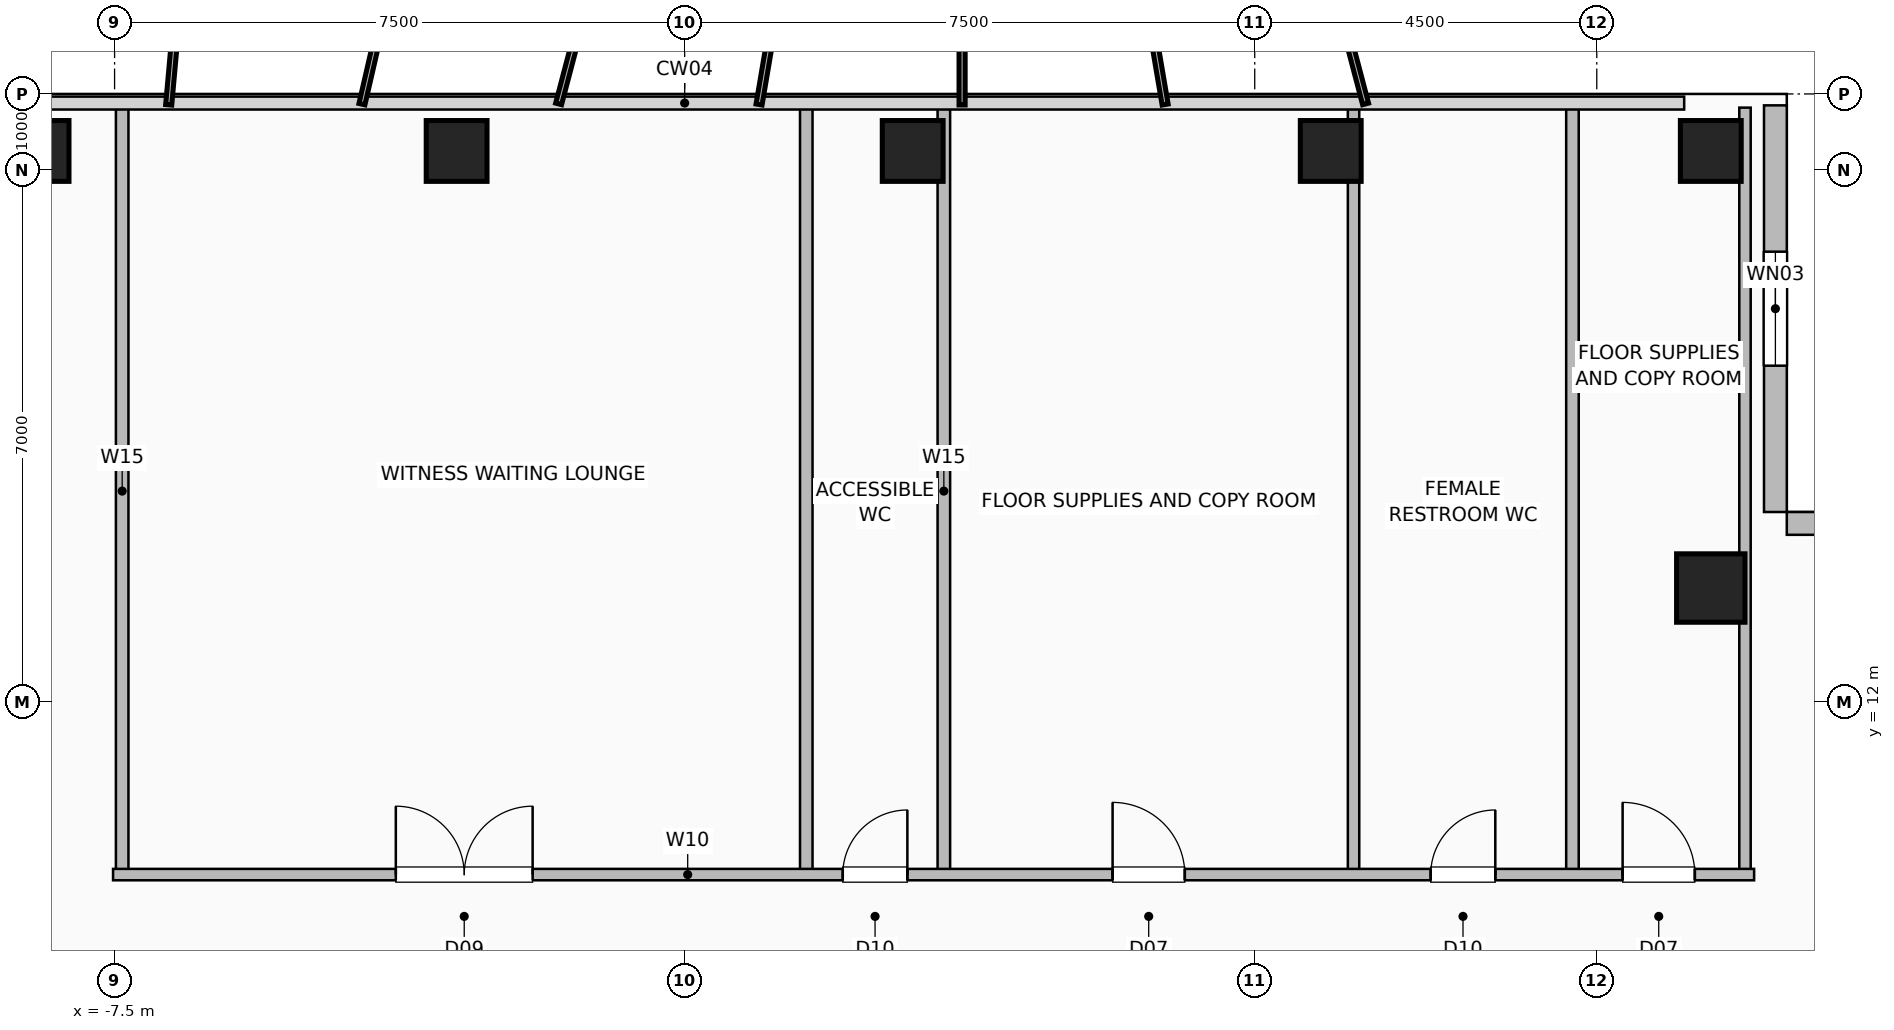
"""IFC4 building model, lengths in metres.
Left out: names, types, materials, properties, quantities, classifications, styles, units other than length and angle.
Written with IfcOpenShell. Run it as: python <this file> out.ifc"""

import sys

from ifc_helpers import new_model, si_unit, direction, frame, frame_2d, origin, origin_2d, place, context, subcontext, project, spatial, rectangle, hollow_rectangle, extrude, element, fill, save


model = new_model("IFC4")
c1 = context("Model", 3, precision=1e-05, world=origin(), true_north=direction((0.0, 1.0)))
c2 = subcontext(c1, "Body", "Model", "MODEL_VIEW")
j1 = project(units=[si_unit("LENGTHUNIT", "METRE"), si_unit("PLANEANGLEUNIT", "RADIAN")], contexts=[c1])
p1 = place(None, origin())
s1 = spatial("IfcSite", under=j1, at=p1, CompositionType="ELEMENT")
p2 = place(p1, origin())
s2 = spatial("IfcBuilding", under=s1, at=p2, CompositionType="ELEMENT")
p3 = place(p2, frame((0.0, 0.0, 184.2)))
s3 = spatial("IfcBuildingStorey", under=s2, at=p3, CompositionType="ELEMENT", Elevation=184.2)
for number, where, z_axis, x_axis in (
    (1, (-8.5, 19.25, 0.0), (0.0, 0.0, 1.0), (1.0, 0.0, 0.0)),
    (2, (-3.0, 19.25, 0.0), (0.0, 0.0, 1.0), (1.0, 0.0, 0.0)),
    (3, (3.0, 19.25, 0.0), (0.0, 0.0, 1.0), (1.0, 0.0, 0.0)),
    (4, (8.5, 19.25, 0.0), (0.0, 0.0, 1.0), (1.0, 0.0, 0.0)),
    (5, (13.5, 19.25, 0.0), (0.0, 0.0, 1.0), (1.0, 0.0, 0.0)),
):
    element("IfcColumn", number, at=place(p3, frame(where, z_axis=z_axis, x_axis=x_axis)), inside=s3, PredefinedType="COLUMN", context=c2, shape_type="SweptSolid", body=[
        extrude(hollow_rectangle(XDim=0.8, YDim=0.8, WallThickness=0.04, at=origin_2d()), origin(), (0.0, 0.0, 1.0), 3.6),
    ])
p4 = place(p3, frame((13.5, 13.5, 0.0), z_axis=(0.0, 0.0, 1.0), x_axis=(1.0, 0.0, 0.0)))
e6 = element("IfcColumn", 6, at=p4, inside=s3, PredefinedType="COLUMN", context=c2, shape_type="SweptSolid", body=[
    extrude(hollow_rectangle(XDim=0.9, YDim=0.9, WallThickness=0.045, at=origin_2d()), origin(), (0.0, 0.0, 1.0), 3.6),
])
p5 = place(p3, frame((14.35, 19.85, 0.0), z_axis=(0.0, 0.0, 1.0), x_axis=(0.0, -1.0, 0.0)))
e7 = element("IfcWall", 7, at=p5, inside=s3, PredefinedType="SOLIDWALL", context=c2, shape_type="SweptSolid", body=[
    extrude(rectangle(XDim=5.35, YDim=0.3, at=frame_2d((2.675, 0.0))), origin(), (0.0, 0.0, 1.0), 3.36),
])
p6 = place(p5, frame((1.925, 0.0, 0.9)))
e8 = element("IfcOpeningElement", 8, at=p6, cuts=e7, PredefinedType="OPENING", context=c2, shape_type="SweptSolid", body=[
    extrude(rectangle(XDim=1.5, YDim=1.8, at=frame_2d((0.75, 0.9))), frame((0.0, 0.16, 0.0), z_axis=(0.0, -1.0, 0.0), x_axis=(1.0, 0.0, 0.0)), (0.0, 0.0, 1.0), 0.32),
])
p7 = place(p3, frame((19.85, 14.35, 0.0), z_axis=(0.0, 0.0, 1.0), x_axis=(-1.0, 0.0, 0.0)))
e9 = element("IfcWall", 9, at=p7, inside=s3, PredefinedType="SOLIDWALL", context=c2, shape_type="SweptSolid", body=[
    extrude(rectangle(XDim=5.35, YDim=0.3, at=frame_2d((2.675, 0.0))), origin(), (0.0, 0.0, 1.0), 3.36),
])
for number, where, z_axis, x_axis in (
    (10, (3.41, 9.73, 0.0), (0.0, 0.0, 1.0), (0.0, 1.0, 0.0)),
    (11, (11.68, 9.73, 0.0), (0.0, 0.0, 1.0), (0.0, 1.0, 0.0)),
    (12, (-7.4, 9.73, 0.0), (0.0, 0.0, 1.0), (0.0, 1.0, 0.0)),
    (13, (1.6, 9.73, 0.0), (0.0, 0.0, 1.0), (0.0, 1.0, 0.0)),
):
    element("IfcWall", number, at=place(p3, frame(where, z_axis=z_axis, x_axis=x_axis)), inside=s3, PredefinedType="PLUMBINGWALL", context=c2, shape_type="SweptSolid", body=[
        extrude(rectangle(XDim=10.09, YDim=0.165, at=frame_2d((5.045, 0.0))), origin(), (0.0, 0.0, 1.0), 3.36),
    ])
for number, where, z_axis, x_axis in (
    (14, (8.8, 9.73, 0.0), (0.0, 0.0, 1.0), (0.0, 1.0, 0.0)),
    (15, (13.95, 9.73, 0.0), (0.0, 0.0, 1.0), (0.0, 1.0, 0.0)),
):
    element("IfcWall", number, at=place(p3, frame(where, z_axis=z_axis, x_axis=x_axis)), inside=s3, PredefinedType="PARTITIONING", context=c2, shape_type="SweptSolid", body=[
        extrude(rectangle(XDim=10.09, YDim=0.15, at=frame_2d((5.045, 0.0))), origin(), (0.0, 0.0, 1.0), 3.36),
    ])
p8 = place(p3, frame((-7.52, 9.73, 0.0), z_axis=(0.0, 0.0, 1.0), x_axis=(1.0, 0.0, 0.0)))
e16 = element("IfcWall", 16, at=p8, inside=s3, PredefinedType="PARTITIONING", context=c2, shape_type="SweptSolid", body=[
    extrude(rectangle(XDim=21.59, YDim=0.15, at=frame_2d((10.795, 0.0))), origin(), (0.0, 0.0, 1.0), 3.36),
])
p9 = place(p8, frame((3.72, 0.0, 0.0)))
e17 = element("IfcOpeningElement", 17, at=p9, cuts=e16, PredefinedType="OPENING", context=c2, shape_type="SweptSolid", body=[
    extrude(rectangle(XDim=1.8, YDim=2.08, at=frame_2d((0.9, 1.04))), frame((0.0, 0.085, 0.0), z_axis=(0.0, -1.0, 0.0), x_axis=(1.0, 0.0, 0.0)), (0.0, 0.0, 1.0), 0.17),
])
p10 = place(p8, frame((9.6, 0.0, 0.0)))
e18 = element("IfcOpeningElement", 18, at=p10, cuts=e16, PredefinedType="OPENING", context=c2, shape_type="SweptSolid", body=[
    extrude(rectangle(XDim=0.85, YDim=2.05, at=frame_2d((0.425, 1.025))), frame((0.0, 0.085, 0.0), z_axis=(0.0, -1.0, 0.0), x_axis=(1.0, 0.0, 0.0)), (0.0, 0.0, 1.0), 0.17),
])
p11 = place(p8, frame((13.15, 0.0, 0.0)))
e19 = element("IfcOpeningElement", 19, at=p11, cuts=e16, PredefinedType="OPENING", context=c2, shape_type="SweptSolid", body=[
    extrude(rectangle(XDim=0.95, YDim=2.06, at=frame_2d((0.475, 1.03))), frame((0.0, 0.085, 0.0), z_axis=(0.0, -1.0, 0.0), x_axis=(1.0, 0.0, 0.0)), (0.0, 0.0, 1.0), 0.17),
])
p12 = place(p8, frame((17.335, 0.0, 0.0)))
e20 = element("IfcOpeningElement", 20, at=p12, cuts=e16, PredefinedType="OPENING", context=c2, shape_type="SweptSolid", body=[
    extrude(rectangle(XDim=0.85, YDim=2.05, at=frame_2d((0.425, 1.025))), frame((0.0, 0.085, 0.0), z_axis=(0.0, -1.0, 0.0), x_axis=(1.0, 0.0, 0.0)), (0.0, 0.0, 1.0), 0.17),
])
p13 = place(p8, frame((19.86, 0.0, 0.0)))
e21 = element("IfcOpeningElement", 21, at=p13, cuts=e16, PredefinedType="OPENING", context=c2, shape_type="SweptSolid", body=[
    extrude(rectangle(XDim=0.95, YDim=2.06, at=frame_2d((0.475, 1.03))), frame((0.0, 0.085, 0.0), z_axis=(0.0, -1.0, 0.0), x_axis=(1.0, 0.0, 0.0)), (0.0, 0.0, 1.0), 0.17),
])
p14 = place(p6, origin())
e22 = element("IfcWindow", 22, at=p14, inside=s3, PartitioningType="SINGLE_PANEL", PredefinedType="WINDOW", context=c2, shape_type="SweptSolid", body=[
    extrude(rectangle(XDim=1.5, YDim=1.8, at=frame_2d((0.75, 0.9))), frame((0.0, 0.03, 0.0), z_axis=(0.0, -1.0, 0.0), x_axis=(1.0, 0.0, 0.0)), (0.0, 0.0, 1.0), 0.06),
])
fill(e8, e22)
p15 = place(p9, origin())
e23 = element("IfcDoor", 23, at=p15, inside=s3, OperationType="DOUBLE_DOOR_SINGLE_SWING", PredefinedType="DOOR", context=c2, shape_type="SweptSolid", body=[
    extrude(rectangle(XDim=1.8, YDim=2.08, at=frame_2d((0.9, 1.04))), frame((0.0, 0.025, 0.0), z_axis=(0.0, -1.0, 0.0), x_axis=(1.0, 0.0, 0.0)), (0.0, 0.0, 1.0), 0.05),
])
fill(e17, e23)
p16 = place(p10, origin())
e24 = element("IfcDoor", 24, at=p16, inside=s3, OperationType="SINGLE_SWING_RIGHT", PredefinedType="DOOR", context=c2, shape_type="SweptSolid", body=[
    extrude(rectangle(XDim=0.85, YDim=2.05, at=frame_2d((0.425, 1.025))), frame((0.0, 0.025, 0.0), z_axis=(0.0, -1.0, 0.0), x_axis=(1.0, 0.0, 0.0)), (0.0, 0.0, 1.0), 0.05),
])
fill(e18, e24)
p17 = place(p11, origin())
e25 = element("IfcDoor", 25, at=p17, inside=s3, OperationType="SINGLE_SWING_LEFT", PredefinedType="DOOR", context=c2, shape_type="SweptSolid", body=[
    extrude(rectangle(XDim=0.95, YDim=2.06, at=frame_2d((0.475, 1.03))), frame((0.0, 0.025, 0.0), z_axis=(0.0, -1.0, 0.0), x_axis=(1.0, 0.0, 0.0)), (0.0, 0.0, 1.0), 0.05),
])
fill(e19, e25)
p18 = place(p12, origin())
e26 = element("IfcDoor", 26, at=p18, inside=s3, OperationType="SINGLE_SWING_RIGHT", PredefinedType="DOOR", context=c2, shape_type="SweptSolid", body=[
    extrude(rectangle(XDim=0.85, YDim=2.05, at=frame_2d((0.425, 1.025))), frame((0.0, 0.025, 0.0), z_axis=(0.0, -1.0, 0.0), x_axis=(1.0, 0.0, 0.0)), (0.0, 0.0, 1.0), 0.05),
])
fill(e20, e26)
p19 = place(p13, origin())
e27 = element("IfcDoor", 27, at=p19, inside=s3, OperationType="SINGLE_SWING_LEFT", PredefinedType="DOOR", context=c2, shape_type="SweptSolid", body=[
    extrude(rectangle(XDim=0.95, YDim=2.06, at=frame_2d((0.475, 1.03))), frame((0.0, 0.025, 0.0), z_axis=(0.0, -1.0, 0.0), x_axis=(1.0, 0.0, 0.0)), (0.0, 0.0, 1.0), 0.05),
])
fill(e21, e27)
save(model, sys.argv[1])
